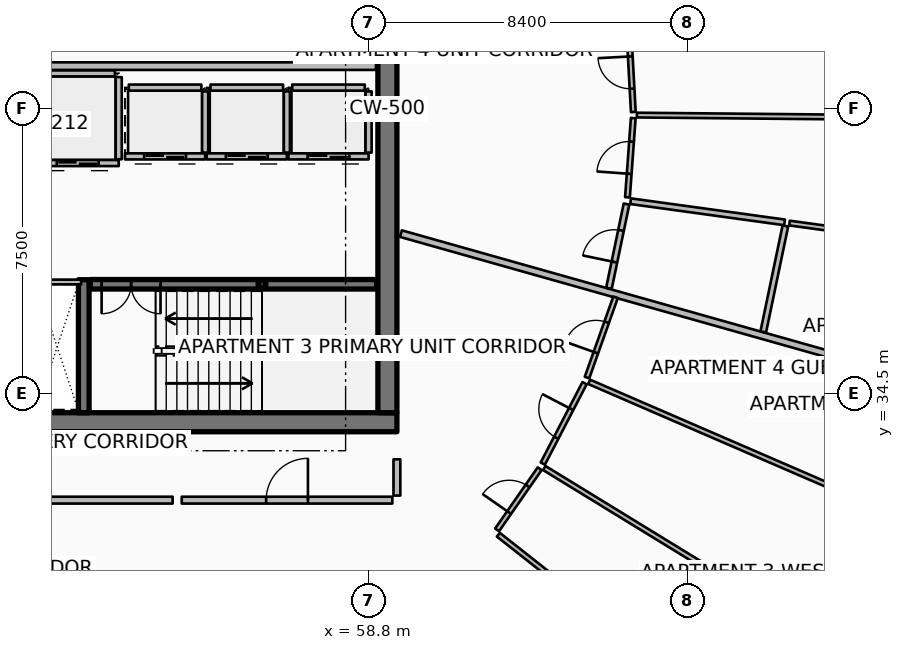
"""IFC4 building model, lengths in metres.
Left out: names, types, materials, properties, quantities, classifications, styles, units other than length and angle.
Written with IfcOpenShell. Run it as: python <this file> out.ifc"""

import sys

from ifc_helpers import new_model, si_unit, direction, frame, frame_2d, origin, origin_2d, place, context, subcontext, project, spatial, rectangle, hollow_rectangle, extrude, element, fill, save


model = new_model("IFC4")
c1 = context("Model", 3, precision=1e-05, world=origin(), true_north=direction((0.0, 1.0)))
c2 = subcontext(c1, "Body", "Model", "MODEL_VIEW")
j1 = project(units=[si_unit("LENGTHUNIT", "METRE"), si_unit("PLANEANGLEUNIT", "RADIAN")], contexts=[c1])
p1 = place(None, origin())
s1 = spatial("IfcSite", under=j1, at=p1, CompositionType="ELEMENT")
p2 = place(p1, origin())
s2 = spatial("IfcBuilding", under=s1, at=p2, CompositionType="ELEMENT")
p3 = place(p2, frame((0.0, 0.0, 279.05)))
s3 = spatial("IfcBuildingStorey", under=s2, at=p3, CompositionType="ELEMENT", Elevation=279.05)
p4 = place(p3, frame((49.95, 33.75, 0.0), z_axis=(0.0, 0.0, 1.0), x_axis=(1.0, 0.0, 0.0)))
e1 = element("IfcWall", 1, at=p4, inside=s3, PredefinedType="SHEAR", context=c2, shape_type="SweptSolid", body=[
    extrude(rectangle(XDim=9.6, YDim=0.5, at=frame_2d((4.8, 0.0))), origin(), (0.0, 0.0, 1.0), 3.85),
])
p5 = place(p3, frame((59.3, 34.0, 0.0), z_axis=(0.0, 0.0, 1.0), x_axis=(0.0, 1.0, 0.0)))
e2 = element("IfcWall", 2, at=p5, inside=s3, PredefinedType="SHEAR", context=c2, shape_type="SweptSolid", body=[
    extrude(rectangle(XDim=16.0, YDim=0.5, at=frame_2d((8.0, 0.0))), origin(), (0.0, 0.0, 1.0), 3.85),
])
p6 = place(p3, frame((51.31, 34.0, 0.0), z_axis=(0.0, 0.0, 1.0), x_axis=(0.0, 1.0, 0.0)))
e3 = element("IfcWall", 3, at=p6, inside=s3, PredefinedType="SHEAR", context=c2, shape_type="SweptSolid", body=[
    extrude(rectangle(XDim=3.5, YDim=0.28, at=frame_2d((1.75, 0.0))), origin(), (0.0, 0.0, 1.0), 3.85),
])
p7 = place(p3, frame((56.0, 37.38, 0.0), z_axis=(0.0, 0.0, 1.0), x_axis=(1.0, 0.0, 0.0)))
e4 = element("IfcColumn", 4, at=p7, inside=s3, PredefinedType="COLUMN", context=c2, shape_type="SweptSolid", body=[
    extrude(hollow_rectangle(XDim=0.2, YDim=0.2, WallThickness=0.01, InnerFilletRadius=0.01, OuterFilletRadius=0.02, at=origin_2d()), origin(), (0.0, 0.0, 1.0), 1.72),
])
p8 = place(p3, frame((69.258, 25.178, 0.0), z_axis=(0.0, 0.0, 1.0), x_axis=(0.636680093065, 0.771128043255, 0.0)))
e5 = element("IfcWall", 5, at=p8, inside=s3, PredefinedType="SOLIDWALL", context=c2, shape_type="SweptSolid", body=[
    extrude(rectangle(XDim=11.438, YDim=0.24, at=frame_2d((5.719, 0.0))), origin(), (0.0, 0.0, 1.0), 2.54),
])
p9 = place(p8, frame((9.218, 0.0, 0.0)))
e6 = element("IfcOpeningElement", 6, at=p9, cuts=e5, PredefinedType="OPENING", context=c2, shape_type="SweptSolid", body=[
    extrude(rectangle(XDim=1.45, YDim=2.15, at=frame_2d((0.725, 1.075))), frame((0.0, 0.13, 0.0), z_axis=(0.0, -1.0, 0.0), x_axis=(1.0, 0.0, 0.0)), (0.0, 0.0, 1.0), 0.26),
])
p10 = place(p8, frame((0.28, 0.0, 0.65)))
e7 = element("IfcOpeningElement", 7, at=p10, cuts=e5, PredefinedType="OPENING", context=c2, shape_type="SweptSolid", body=[
    extrude(rectangle(XDim=1.6, YDim=1.5, at=frame_2d((0.8, 0.75))), frame((0.0, 0.13, 0.0), z_axis=(0.0, -1.0, 0.0), x_axis=(1.0, 0.0, 0.0)), (0.0, 0.0, 1.0), 0.26),
])
p11 = place(p3, frame((51.48, 37.38, 0.0), z_axis=(0.0, 0.0, 1.0), x_axis=(1.0, 0.0, 0.0)))
e8 = element("IfcWall", 8, at=p11, inside=s3, PredefinedType="SOLIDWALL", context=c2, shape_type="SweptSolid", body=[
    extrude(rectangle(XDim=7.54, YDim=0.25, at=frame_2d((3.77, 0.0))), origin(), (0.0, 0.0, 1.0), 3.59),
])
p12 = place(p11, frame((0.3, 0.0, 0.0)))
e9 = element("IfcOpeningElement", 9, at=p12, cuts=e8, PredefinedType="OPENING", context=c2, shape_type="SweptSolid", body=[
    extrude(rectangle(XDim=1.55, YDim=2.15, at=frame_2d((0.775, 1.075))), frame((0.0, 0.135, 0.0), z_axis=(0.0, -1.0, 0.0), x_axis=(1.0, 0.0, 0.0)), (0.0, 0.0, 1.0), 0.27),
])
p13 = place(p3, frame((54.505, 40.745, 0.0), z_axis=(0.0, 0.0, 1.0), x_axis=(-1.0, 0.0, 0.0)))
e10 = element("IfcWall", 10, at=p13, inside=s3, PredefinedType="PARTITIONING", context=c2, shape_type="SweptSolid", body=[
    extrude(rectangle(XDim=2.11, YDim=0.16, at=frame_2d((1.055, 0.0))), origin(), (0.0, 0.0, 1.0), 3.59),
])
p14 = place(p13, frame((0.505, 0.0, 0.0)))
e11 = element("IfcOpeningElement", 11, at=p14, cuts=e10, PredefinedType="OPENING", context=c2, shape_type="SweptSolid", body=[
    extrude(rectangle(XDim=1.1, YDim=2.1, at=frame_2d((0.55, 1.05))), frame((0.0, 0.09, 0.0), z_axis=(0.0, -1.0, 0.0), x_axis=(1.0, 0.0, 0.0)), (0.0, 0.0, 1.0), 0.18),
])
p15 = place(p3, frame((54.505, 40.845, 0.0), z_axis=(0.0, 0.0, 1.0), x_axis=(0.0, 1.0, 0.0)))
e12 = element("IfcWall", 12, at=p15, inside=s3, PredefinedType="PARTITIONING", context=c2, shape_type="SweptSolid", body=[
    extrude(rectangle(XDim=1.61, YDim=0.16, at=frame_2d((0.805, 0.0))), origin(), (0.0, 0.0, 1.0), 3.59),
])
p16 = place(p3, frame((52.495, 42.555, 0.0), z_axis=(0.0, 0.0, 1.0), x_axis=(1.0, 0.0, 0.0)))
e13 = element("IfcWall", 13, at=p16, inside=s3, PredefinedType="PARTITIONING", context=c2, shape_type="SweptSolid", body=[
    extrude(rectangle(XDim=1.91, YDim=0.16, at=frame_2d((0.955, 0.0))), origin(), (0.0, 0.0, 1.0), 3.59),
])
p17 = place(p3, frame((56.655, 40.745, 0.0), z_axis=(0.0, 0.0, 1.0), x_axis=(-1.0, 0.0, 0.0)))
e14 = element("IfcWall", 14, at=p17, inside=s3, PredefinedType="PARTITIONING", context=c2, shape_type="SweptSolid", body=[
    extrude(rectangle(XDim=2.11, YDim=0.16, at=frame_2d((1.055, 0.0))), origin(), (0.0, 0.0, 1.0), 3.59),
])
p18 = place(p17, frame((0.505, 0.0, 0.0)))
e15 = element("IfcOpeningElement", 15, at=p18, cuts=e14, PredefinedType="OPENING", context=c2, shape_type="SweptSolid", body=[
    extrude(rectangle(XDim=1.1, YDim=2.1, at=frame_2d((0.55, 1.05))), frame((0.0, 0.09, 0.0), z_axis=(0.0, -1.0, 0.0), x_axis=(1.0, 0.0, 0.0)), (0.0, 0.0, 1.0), 0.18),
])
p19 = place(p3, frame((56.655, 40.845, 0.0), z_axis=(0.0, 0.0, 1.0), x_axis=(0.0, 1.0, 0.0)))
e16 = element("IfcWall", 16, at=p19, inside=s3, PredefinedType="PARTITIONING", context=c2, shape_type="SweptSolid", body=[
    extrude(rectangle(XDim=1.61, YDim=0.16, at=frame_2d((0.805, 0.0))), origin(), (0.0, 0.0, 1.0), 3.59),
])
p20 = place(p3, frame((54.645, 42.555, 0.0), z_axis=(0.0, 0.0, 1.0), x_axis=(1.0, 0.0, 0.0)))
e17 = element("IfcWall", 17, at=p20, inside=s3, PredefinedType="PARTITIONING", context=c2, shape_type="SweptSolid", body=[
    extrude(rectangle(XDim=1.91, YDim=0.16, at=frame_2d((0.955, 0.0))), origin(), (0.0, 0.0, 1.0), 3.59),
])
p21 = place(p3, frame((58.805, 40.745, 0.0), z_axis=(0.0, 0.0, 1.0), x_axis=(-1.0, 0.0, 0.0)))
e18 = element("IfcWall", 18, at=p21, inside=s3, PredefinedType="PARTITIONING", context=c2, shape_type="SweptSolid", body=[
    extrude(rectangle(XDim=2.11, YDim=0.16, at=frame_2d((1.055, 0.0))), origin(), (0.0, 0.0, 1.0), 3.59),
])
p22 = place(p21, frame((0.505, 0.0, 0.0)))
e19 = element("IfcOpeningElement", 19, at=p22, cuts=e18, PredefinedType="OPENING", context=c2, shape_type="SweptSolid", body=[
    extrude(rectangle(XDim=1.1, YDim=2.1, at=frame_2d((0.55, 1.05))), frame((0.0, 0.09, 0.0), z_axis=(0.0, -1.0, 0.0), x_axis=(1.0, 0.0, 0.0)), (0.0, 0.0, 1.0), 0.18),
])
p23 = place(p3, frame((58.805, 40.845, 0.0), z_axis=(0.0, 0.0, 1.0), x_axis=(0.0, 1.0, 0.0)))
e20 = element("IfcWall", 20, at=p23, inside=s3, PredefinedType="PARTITIONING", context=c2, shape_type="SweptSolid", body=[
    extrude(rectangle(XDim=1.61, YDim=0.16, at=frame_2d((0.805, 0.0))), origin(), (0.0, 0.0, 1.0), 3.59),
])
p24 = place(p3, frame((56.795, 42.555, 0.0), z_axis=(0.0, 0.0, 1.0), x_axis=(1.0, 0.0, 0.0)))
e21 = element("IfcWall", 21, at=p24, inside=s3, PredefinedType="PARTITIONING", context=c2, shape_type="SweptSolid", body=[
    extrude(rectangle(XDim=1.91, YDim=0.16, at=frame_2d((0.955, 0.0))), origin(), (0.0, 0.0, 1.0), 3.59),
])
p25 = place(p3, frame((52.23, 40.57, 0.0), z_axis=(0.0, 0.0, 1.0), x_axis=(-1.0, 0.0, 0.0)))
e22 = element("IfcWall", 22, at=p25, inside=s3, PredefinedType="PARTITIONING", context=c2, shape_type="SweptSolid", body=[
    extrude(rectangle(XDim=2.16, YDim=0.16, at=frame_2d((1.08, 0.0))), origin(), (0.0, 0.0, 1.0), 3.59),
])
p26 = place(p25, frame((0.53, 0.0, 0.0)))
e23 = element("IfcOpeningElement", 23, at=p26, cuts=e22, PredefinedType="OPENING", context=c2, shape_type="SweptSolid", body=[
    extrude(rectangle(XDim=1.1, YDim=2.1, at=frame_2d((0.55, 1.05))), frame((0.0, 0.09, 0.0), z_axis=(0.0, -1.0, 0.0), x_axis=(1.0, 0.0, 0.0)), (0.0, 0.0, 1.0), 0.18),
])
p27 = place(p3, frame((52.23, 40.67, 0.0), z_axis=(0.0, 0.0, 1.0), x_axis=(0.0, 1.0, 0.0)))
e24 = element("IfcWall", 24, at=p27, inside=s3, PredefinedType="PARTITIONING", context=c2, shape_type="SweptSolid", body=[
    extrude(rectangle(XDim=2.16, YDim=0.16, at=frame_2d((1.08, 0.0))), origin(), (0.0, 0.0, 1.0), 3.59),
])
p28 = place(p3, frame((50.17, 42.93, 0.0), z_axis=(0.0, 0.0, 1.0), x_axis=(1.0, 0.0, 0.0)))
e25 = element("IfcWall", 25, at=p28, inside=s3, PredefinedType="PARTITIONING", context=c2, shape_type="SweptSolid", body=[
    extrude(rectangle(XDim=1.96, YDim=0.16, at=frame_2d((0.98, 0.0))), origin(), (0.0, 0.0, 1.0), 3.59),
])
p29 = place(p3, frame((50.12, 43.12, 0.0), z_axis=(0.0, 0.0, 1.0), x_axis=(1.0, 0.0, 0.0)))
e26 = element("IfcWall", 26, at=p29, inside=s3, PredefinedType="PARTITIONING", context=c2, shape_type="SweptSolid", body=[
    extrude(rectangle(XDim=8.88, YDim=0.2, at=frame_2d((4.44, 0.0))), origin(), (0.0, 0.0, 1.0), 3.59),
])
p30 = place(p3, frame((49.98, 37.44, 0.0), z_axis=(0.0, 0.0, 1.0), x_axis=(1.0, 0.0, 0.0)))
e27 = element("IfcWall", 27, at=p30, inside=s3, PredefinedType="PARTITIONING", context=c2, shape_type="SweptSolid", body=[
    extrude(rectangle(XDim=1.26, YDim=0.125, at=frame_2d((0.63, 0.0))), origin(), (0.0, 0.0, 1.0), 3.03),
])
p31 = place(p3, frame((49.232, 31.591, 0.0), z_axis=(0.0, 0.0, 1.0), x_axis=(0.117545848714, -0.993067456646, 0.0)))
e28 = element("IfcWall", 28, at=p31, inside=s3, PredefinedType="PARTITIONING", context=c2, shape_type="SweptSolid", body=[
    extrude(rectangle(XDim=14.213, YDim=0.18, at=frame_2d((7.106, 0.0))), origin(), (0.0, 0.0, 1.0), 2.957),
])
p32 = place(p3, frame((59.656, 38.713, 0.0), z_axis=(0.0, 0.0, 1.0), x_axis=(0.962454756022, -0.27144215334, 0.0)))
e29 = element("IfcWall", 29, at=p32, inside=s3, PredefinedType="PARTITIONING", context=c2, shape_type="SweptSolid", body=[
    extrude(rectangle(XDim=17.385, YDim=0.18, at=frame_2d((8.692, 0.0))), origin(), (0.0, 0.0, 1.0), 2.957),
])
p33 = place(p3, frame((53.888, 31.7, 0.0), z_axis=(0.0, 0.0, 1.0), x_axis=(1.0, 0.0, 0.0)))
e30 = element("IfcWall", 30, at=p33, inside=s3, PredefinedType="PARTITIONING", context=c2, shape_type="SweptSolid", body=[
    extrude(rectangle(XDim=5.542, YDim=0.18, at=frame_2d((2.771, 0.0))), origin(), (0.0, 0.0, 1.0), 2.957),
])
p34 = place(p33, frame((2.221, 0.0, 0.0)))
e31 = element("IfcOpeningElement", 31, at=p34, cuts=e30, PredefinedType="OPENING", context=c2, shape_type="SweptSolid", body=[
    extrude(rectangle(XDim=1.1, YDim=2.1, at=frame_2d((0.55, 1.05))), frame((0.0, 0.1, 0.0), z_axis=(0.0, -1.0, 0.0), x_axis=(1.0, 0.0, 0.0)), (0.0, 0.0, 1.0), 0.2),
])
p35 = place(p3, frame((59.55, 31.82, 0.0), z_axis=(0.0, 0.0, 1.0), x_axis=(0.0, 1.0, 0.0)))
e32 = element("IfcWall", 32, at=p35, inside=s3, PredefinedType="PARTITIONING", context=c2, shape_type="SweptSolid", body=[
    extrude(rectangle(XDim=0.955, YDim=0.18, at=frame_2d((0.477, 0.0))), origin(), (0.0, 0.0, 1.0), 2.957),
])
p36 = place(p3, frame((49.339, 31.7, 0.0), z_axis=(0.0, 0.0, 1.0), x_axis=(1.0, 0.0, 0.0)))
e33 = element("IfcWall", 33, at=p36, inside=s3, PredefinedType="PARTITIONING", context=c2, shape_type="SweptSolid", body=[
    extrude(rectangle(XDim=4.309, YDim=0.18, at=frame_2d((2.155, 0.0))), origin(), (0.0, 0.0, 1.0), 2.957),
])
p37 = place(p3, frame((62.219, 30.791, 0.0), z_axis=(0.0, 0.0, 1.0), x_axis=(0.785316198055, -0.619094878893, 0.0)))
e34 = element("IfcWall", 34, at=p37, inside=s3, PredefinedType="PARTITIONING", context=c2, shape_type="SweptSolid", body=[
    extrude(rectangle(XDim=8.979, YDim=0.125, at=frame_2d((4.489, 0.0))), origin(), (0.0, 0.0, 1.0), 2.957),
])
p38 = place(p3, frame((63.429, 32.545, 0.0), z_axis=(0.0, 0.0, 1.0), x_axis=(0.852634226121, -0.522508254907, 0.0)))
e35 = element("IfcWall", 35, at=p38, inside=s3, PredefinedType="PARTITIONING", context=c2, shape_type="SweptSolid", body=[
    extrude(rectangle(XDim=9.151, YDim=0.125, at=frame_2d((4.576, 0.0))), origin(), (0.0, 0.0, 1.0), 3.03),
])
p39 = place(p3, frame((64.608, 34.813, 0.0), z_axis=(0.0, 0.0, 1.0), x_axis=(0.917754543675, -0.397148080146, 0.0)))
e36 = element("IfcWall", 36, at=p39, inside=s3, PredefinedType="PARTITIONING", context=c2, shape_type="SweptSolid", body=[
    extrude(rectangle(XDim=9.994, YDim=0.125, at=frame_2d((4.997, 0.0))), origin(), (0.0, 0.0, 1.0), 3.03),
])
p40 = place(p3, frame((62.186, 30.918, 0.0), z_axis=(0.0, 0.0, 1.0), x_axis=(0.571797742108, 0.820394625848, 0.0)))
e37 = element("IfcWall", 37, at=p40, inside=s3, PredefinedType="PARTITIONING", context=c2, shape_type="SweptSolid", body=[
    extrude(rectangle(XDim=1.96, YDim=0.125, at=frame_2d((0.98, 0.0))), origin(), (0.0, 0.0, 1.0), 2.957),
])
p41 = place(p40, frame((0.555, 0.0, 0.0)))
e38 = element("IfcOpeningElement", 38, at=p41, cuts=e37, PredefinedType="OPENING", context=c2, shape_type="SweptSolid", body=[
    extrude(rectangle(XDim=0.85, YDim=2.06, at=frame_2d((0.425, 1.03))), frame((0.0, 0.073, 0.0), z_axis=(0.0, -1.0, 0.0), x_axis=(1.0, 0.0, 0.0)), (0.0, 0.0, 1.0), 0.145),
])
p42 = place(p3, frame((63.389, 32.663, 0.0), z_axis=(0.0, 0.0, 1.0), x_axis=(0.461007635573, 0.887396168542, 0.0)))
e39 = element("IfcWall", 39, at=p42, inside=s3, PredefinedType="PARTITIONING", context=c2, shape_type="SweptSolid", body=[
    extrude(rectangle(XDim=2.384, YDim=0.125, at=frame_2d((1.192, 0.0))), origin(), (0.0, 0.0, 1.0), 3.03),
])
p43 = place(p42, frame((0.767, 0.0, 0.0)))
e40 = element("IfcOpeningElement", 40, at=p43, cuts=e39, PredefinedType="OPENING", context=c2, shape_type="SweptSolid", body=[
    extrude(rectangle(XDim=0.85, YDim=2.06, at=frame_2d((0.425, 1.03))), frame((0.0, 0.073, 0.0), z_axis=(0.0, -1.0, 0.0), x_axis=(1.0, 0.0, 0.0)), (0.0, 0.0, 1.0), 0.145),
])
p44 = place(p3, frame((64.552, 34.924, 0.0), z_axis=(0.0, 0.0, 1.0), x_axis=(0.335011815583, 0.942213926569, 0.0)))
e41 = element("IfcWall", 41, at=p44, inside=s3, PredefinedType="PARTITIONING", context=c2, shape_type="SweptSolid", body=[
    extrude(rectangle(XDim=2.242, YDim=0.125, at=frame_2d((1.121, 0.0))), origin(), (0.0, 0.0, 1.0), 2.957),
])
p45 = place(p44, frame((0.696, 0.0, 0.0)))
e42 = element("IfcOpeningElement", 42, at=p45, cuts=e41, PredefinedType="OPENING", context=c2, shape_type="SweptSolid", body=[
    extrude(rectangle(XDim=0.85, YDim=2.06, at=frame_2d((0.425, 1.03))), frame((0.0, 0.073, 0.0), z_axis=(0.0, -1.0, 0.0), x_axis=(1.0, 0.0, 0.0)), (0.0, 0.0, 1.0), 0.145),
])
p46 = place(p3, frame((65.129, 37.273, 0.0), z_axis=(0.0, 0.0, 1.0), x_axis=(0.204337271361, 0.978900546293, 0.0)))
e43 = element("IfcWall", 43, at=p46, inside=s3, PredefinedType="PARTITIONING", context=c2, shape_type="SweptSolid", body=[
    extrude(rectangle(XDim=2.265, YDim=0.15, at=frame_2d((1.133, 0.0))), origin(), (0.0, 0.0, 1.0), 2.957),
])
p47 = place(p46, frame((0.708, 0.0, 0.0)))
e44 = element("IfcOpeningElement", 44, at=p47, cuts=e43, PredefinedType="OPENING", context=c2, shape_type="SweptSolid", body=[
    extrude(rectangle(XDim=0.85, YDim=2.06, at=frame_2d((0.425, 1.03))), frame((0.0, 0.085, 0.0), z_axis=(0.0, -1.0, 0.0), x_axis=(1.0, 0.0, 0.0)), (0.0, 0.0, 1.0), 0.17),
])
p48 = place(p3, frame((69.191, 36.127, 0.0), z_axis=(0.0, 0.0, 1.0), x_axis=(0.204269165827, 0.978914760279, 0.0)))
e45 = element("IfcWall", 45, at=p48, inside=s3, PredefinedType="PARTITIONING", context=c2, shape_type="SweptSolid", body=[
    extrude(rectangle(XDim=2.848, YDim=0.15, at=frame_2d((1.424, 0.0))), origin(), (0.0, 0.0, 1.0), 2.957),
])
p49 = place(p3, frame((65.699, 39.566, 0.0), z_axis=(0.0, 0.0, 1.0), x_axis=(0.990678437061, -0.136221269786, 0.0)))
e46 = element("IfcWall", 46, at=p49, inside=s3, PredefinedType="PARTITIONING", context=c2, shape_type="SweptSolid", body=[
    extrude(rectangle(XDim=4.09, YDim=0.15, at=frame_2d((2.045, 0.0))), origin(), (0.0, 0.0, 1.0), 3.03),
])
p50 = place(p3, frame((69.88, 38.991, 0.0), z_axis=(0.0, 0.0, 1.0), x_axis=(0.990676269793, -0.13623703046, 0.0)))
e47 = element("IfcWall", 47, at=p50, inside=s3, PredefinedType="PARTITIONING", context=c2, shape_type="SweptSolid", body=[
    extrude(rectangle(XDim=7.532, YDim=0.125, at=frame_2d((3.766, 0.0))), origin(), (0.0, 0.0, 1.0), 3.03),
])
p51 = place(p50, frame((3.341, 0.0, 0.0)))
e48 = element("IfcOpeningElement", 48, at=p51, cuts=e47, PredefinedType="OPENING", context=c2, shape_type="SweptSolid", body=[
    extrude(rectangle(XDim=0.85, YDim=2.06, at=frame_2d((0.425, 1.03))), frame((0.0, 0.073, 0.0), z_axis=(0.0, -1.0, 0.0), x_axis=(1.0, 0.0, 0.0)), (0.0, 0.0, 1.0), 0.145),
])
p52 = place(p3, frame((65.865, 41.832, 0.0), z_axis=(0.0, 0.0, 1.0), x_axis=(0.999955421737, -0.009442168124, 0.0)))
e49 = element("IfcWall", 49, at=p52, inside=s3, PredefinedType="PARTITIONING", context=c2, shape_type="SweptSolid", body=[
    extrude(rectangle(XDim=12.282, YDim=0.125, at=frame_2d((6.141, 0.0))), origin(), (0.0, 0.0, 1.0), 3.03),
])
p53 = place(p3, frame((65.617, 39.668, 0.0), z_axis=(0.0, 0.0, 1.0), x_axis=(0.072890621107, 0.99733994072, 0.0)))
e50 = element("IfcWall", 50, at=p53, inside=s3, PredefinedType="PARTITIONING", context=c2, shape_type="SweptSolid", body=[
    extrude(rectangle(XDim=2.09, YDim=0.125, at=frame_2d((1.045, 0.0))), origin(), (0.0, 0.0, 1.0), 3.03),
])
p54 = place(p53, frame((0.62, 0.0, 0.0)))
e51 = element("IfcOpeningElement", 51, at=p54, cuts=e50, PredefinedType="OPENING", context=c2, shape_type="SweptSolid", body=[
    extrude(rectangle(XDim=0.85, YDim=2.06, at=frame_2d((0.425, 1.03))), frame((0.0, 0.073, 0.0), z_axis=(0.0, -1.0, 0.0), x_axis=(1.0, 0.0, 0.0)), (0.0, 0.0, 1.0), 0.145),
])
p55 = place(p3, frame((65.771, 41.912, 0.0), z_axis=(0.0, 0.0, 1.0), x_axis=(-0.054221950574, 0.998528907982, 0.0)))
e52 = element("IfcWall", 52, at=p55, inside=s3, PredefinedType="PARTITIONING", context=c2, shape_type="SweptSolid", body=[
    extrude(rectangle(XDim=2.08, YDim=0.125, at=frame_2d((1.04, 0.0))), origin(), (0.0, 0.0, 1.0), 2.957),
])
p56 = place(p55, frame((0.615, 0.0, 0.0)))
e53 = element("IfcOpeningElement", 53, at=p56, cuts=e52, PredefinedType="OPENING", context=c2, shape_type="SweptSolid", body=[
    extrude(rectangle(XDim=0.85, YDim=2.06, at=frame_2d((0.425, 1.03))), frame((0.0, 0.073, 0.0), z_axis=(0.0, -1.0, 0.0), x_axis=(1.0, 0.0, 0.0)), (0.0, 0.0, 1.0), 0.145),
])
p57 = place(p12, origin())
e54 = element("IfcDoor", 54, at=p57, inside=s3, OperationType="DOUBLE_DOOR_SINGLE_SWING", PredefinedType="DOOR", context=c2, shape_type="SweptSolid", body=[
    extrude(rectangle(XDim=1.55, YDim=2.15, at=frame_2d((0.775, 1.075))), frame((0.0, 0.025, 0.0), z_axis=(0.0, -1.0, 0.0), x_axis=(1.0, 0.0, 0.0)), (0.0, 0.0, 1.0), 0.05),
])
fill(e9, e54)
p58 = place(p14, origin())
e55 = element("IfcDoor", 55, at=p58, inside=s3, OperationType="DOUBLE_DOOR_SLIDING", PredefinedType="DOOR", context=c2, shape_type="SweptSolid", body=[
    extrude(rectangle(XDim=1.1, YDim=2.1, at=frame_2d((0.55, 1.05))), frame((0.0, 0.025, 0.0), z_axis=(0.0, -1.0, 0.0), x_axis=(1.0, 0.0, 0.0)), (0.0, 0.0, 1.0), 0.05),
])
fill(e11, e55)
p59 = place(p18, origin())
e56 = element("IfcDoor", 56, at=p59, inside=s3, OperationType="DOUBLE_DOOR_SLIDING", PredefinedType="DOOR", context=c2, shape_type="SweptSolid", body=[
    extrude(rectangle(XDim=1.1, YDim=2.1, at=frame_2d((0.55, 1.05))), frame((0.0, 0.025, 0.0), z_axis=(0.0, -1.0, 0.0), x_axis=(1.0, 0.0, 0.0)), (0.0, 0.0, 1.0), 0.05),
])
fill(e15, e56)
p60 = place(p22, origin())
e57 = element("IfcDoor", 57, at=p60, inside=s3, OperationType="DOUBLE_DOOR_SLIDING", PredefinedType="DOOR", context=c2, shape_type="SweptSolid", body=[
    extrude(rectangle(XDim=1.1, YDim=2.1, at=frame_2d((0.55, 1.05))), frame((0.0, 0.025, 0.0), z_axis=(0.0, -1.0, 0.0), x_axis=(1.0, 0.0, 0.0)), (0.0, 0.0, 1.0), 0.05),
])
fill(e19, e57)
p61 = place(p26, origin())
e58 = element("IfcDoor", 58, at=p61, inside=s3, OperationType="DOUBLE_DOOR_SLIDING", PredefinedType="DOOR", context=c2, shape_type="SweptSolid", body=[
    extrude(rectangle(XDim=1.1, YDim=2.1, at=frame_2d((0.55, 1.05))), frame((0.0, 0.025, 0.0), z_axis=(0.0, -1.0, 0.0), x_axis=(1.0, 0.0, 0.0)), (0.0, 0.0, 1.0), 0.05),
])
fill(e23, e58)
p62 = place(p34, origin())
e59 = element("IfcDoor", 59, at=p62, inside=s3, OperationType="SINGLE_SWING_RIGHT", PredefinedType="DOOR", context=c2, shape_type="SweptSolid", body=[
    extrude(rectangle(XDim=1.1, YDim=2.1, at=frame_2d((0.55, 1.05))), frame((0.0, 0.025, 0.0), z_axis=(0.0, -1.0, 0.0), x_axis=(1.0, 0.0, 0.0)), (0.0, 0.0, 1.0), 0.05),
])
fill(e31, e59)
p63 = place(p41, origin())
e60 = element("IfcDoor", 60, at=p63, inside=s3, OperationType="SINGLE_SWING_LEFT", PredefinedType="DOOR", context=c2, shape_type="SweptSolid", body=[
    extrude(rectangle(XDim=0.85, YDim=2.06, at=frame_2d((0.425, 1.03))), frame((0.0, 0.025, 0.0), z_axis=(0.0, -1.0, 0.0), x_axis=(1.0, 0.0, 0.0)), (0.0, 0.0, 1.0), 0.05),
])
fill(e38, e60)
p64 = place(p43, origin())
e61 = element("IfcDoor", 61, at=p64, inside=s3, OperationType="SINGLE_SWING_RIGHT", PredefinedType="DOOR", context=c2, shape_type="SweptSolid", body=[
    extrude(rectangle(XDim=0.85, YDim=2.06, at=frame_2d((0.425, 1.03))), frame((0.0, 0.025, 0.0), z_axis=(0.0, -1.0, 0.0), x_axis=(1.0, 0.0, 0.0)), (0.0, 0.0, 1.0), 0.05),
])
fill(e40, e61)
p65 = place(p45, origin())
e62 = element("IfcDoor", 62, at=p65, inside=s3, OperationType="SINGLE_SWING_LEFT", PredefinedType="DOOR", context=c2, shape_type="SweptSolid", body=[
    extrude(rectangle(XDim=0.85, YDim=2.06, at=frame_2d((0.425, 1.03))), frame((0.0, 0.025, 0.0), z_axis=(0.0, -1.0, 0.0), x_axis=(1.0, 0.0, 0.0)), (0.0, 0.0, 1.0), 0.05),
])
fill(e42, e62)
p66 = place(p47, origin())
e63 = element("IfcDoor", 63, at=p66, inside=s3, OperationType="SINGLE_SWING_LEFT", PredefinedType="DOOR", context=c2, shape_type="SweptSolid", body=[
    extrude(rectangle(XDim=0.85, YDim=2.06, at=frame_2d((0.425, 1.03))), frame((0.0, 0.025, 0.0), z_axis=(0.0, -1.0, 0.0), x_axis=(1.0, 0.0, 0.0)), (0.0, 0.0, 1.0), 0.05),
])
fill(e44, e63)
p67 = place(p54, origin())
e64 = element("IfcDoor", 64, at=p67, inside=s3, OperationType="SINGLE_SWING_LEFT", PredefinedType="DOOR", context=c2, shape_type="SweptSolid", body=[
    extrude(rectangle(XDim=0.85, YDim=2.06, at=frame_2d((0.425, 1.03))), frame((0.0, 0.025, 0.0), z_axis=(0.0, -1.0, 0.0), x_axis=(1.0, 0.0, 0.0)), (0.0, 0.0, 1.0), 0.05),
])
fill(e51, e64)
p68 = place(p56, origin())
e65 = element("IfcDoor", 65, at=p68, inside=s3, OperationType="SINGLE_SWING_RIGHT", PredefinedType="DOOR", context=c2, shape_type="SweptSolid", body=[
    extrude(rectangle(XDim=0.85, YDim=2.06, at=frame_2d((0.425, 1.03))), frame((0.0, 0.025, 0.0), z_axis=(0.0, -1.0, 0.0), x_axis=(1.0, 0.0, 0.0)), (0.0, 0.0, 1.0), 0.05),
])
fill(e53, e65)
save(model, sys.argv[1])
